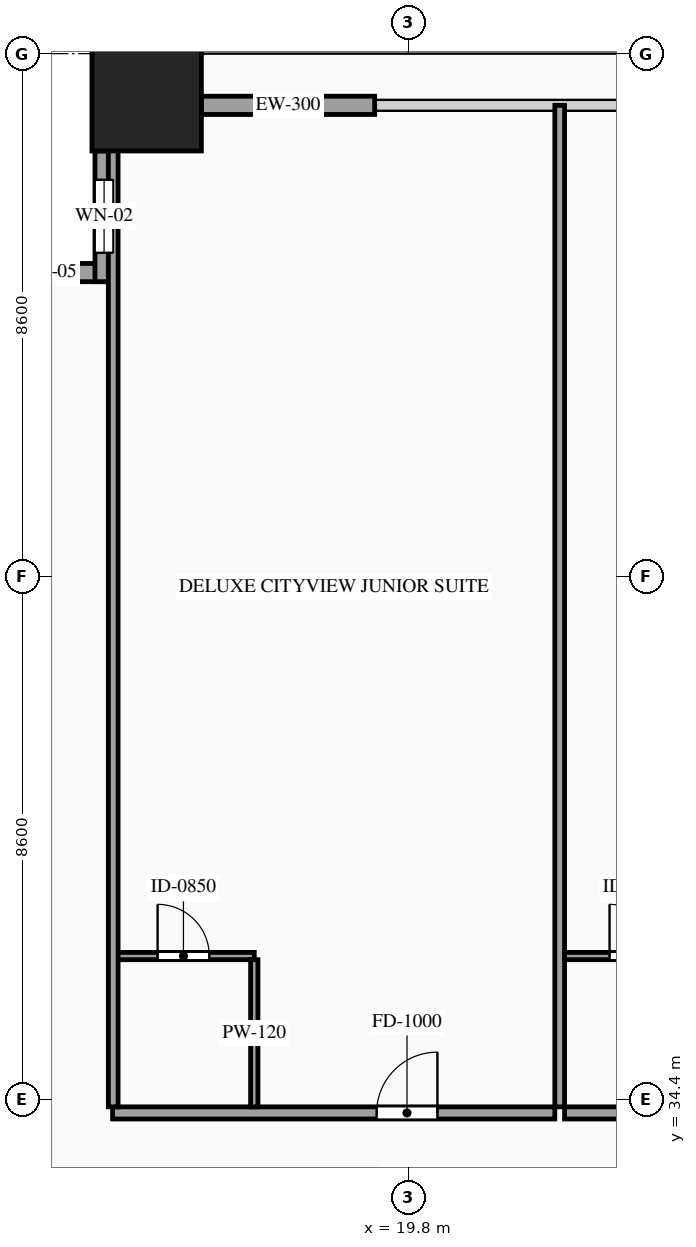
"""IFC4 building model, lengths in metres.
Left out: names, types, materials, properties, quantities, classifications, styles, units other than length and angle.
Written with IfcOpenShell. Run it as: python <this file> out.ifc"""

import sys

from ifc_helpers import new_model, si_unit, direction, frame, frame_2d, origin, origin_2d, place, context, subcontext, project, spatial, rectangle, hollow_rectangle, extrude, source, transform, mapped, element, fill, save


model = new_model("IFC4")
c1 = context("Model", 3, precision=1e-05, world=origin(), true_north=direction((0.0, 1.0)))
c2 = subcontext(c1, "Body", "Model", "MODEL_VIEW")
j1 = project(units=[si_unit("LENGTHUNIT", "METRE"), si_unit("PLANEANGLEUNIT", "RADIAN")], contexts=[c1])
p1 = place(None, origin())
s1 = spatial("IfcSite", under=j1, at=p1, CompositionType="ELEMENT")
p2 = place(p1, origin())
s2 = spatial("IfcBuilding", under=s1, at=p2, CompositionType="ELEMENT")
p3 = place(p2, frame((0.0, 0.0, 34.2)))
s3 = spatial("IfcBuildingStorey", under=s2, at=p3, CompositionType="ELEMENT", Elevation=34.2)
m1 = source(origin(), c2, "Body", "SweptSolid", [
    extrude(hollow_rectangle(XDim=1.8, YDim=1.8, WallThickness=0.08, at=origin_2d()), origin(), (0.0, 0.0, 1.0), 3.6),
])
p4 = place(p3, frame((15.5, 50.9, 0.0), z_axis=(0.0, 0.0, 1.0), x_axis=(1.0, 0.0, 0.0)))
e1 = element("IfcColumn", 1, at=p4, inside=s3, PredefinedType="COLUMN", context=c2, shape_type="MappedRepresentation", body=[
    mapped(m1, transform((0.0, 0.0, 0.0), scale=1.0)),
])
p5 = place(p3, frame((14.95, 48.0, 0.0), z_axis=(0.0, 0.0, 1.0), x_axis=(-1.0, 0.0, 0.0)))
e2 = element("IfcWall", 2, at=p5, inside=s3, PredefinedType="SOLIDWALL", context=c2, shape_type="SweptSolid", body=[
    extrude(rectangle(XDim=2.15, YDim=0.3, at=frame_2d((1.075, 0.0))), origin(), (0.0, 0.0, 1.0), 3.38),
])
p6 = place(p5, frame((0.625, 0.0, 0.85)))
e3 = element("IfcOpeningElement", 3, at=p6, cuts=e2, PredefinedType="OPENING", context=c2, shape_type="SweptSolid", body=[
    extrude(rectangle(XDim=0.9, YDim=1.5, at=frame_2d((0.45, 0.75))), frame((0.0, 0.165, 0.0), z_axis=(0.0, -1.0, 0.0), x_axis=(1.0, 0.0, 0.0)), (0.0, 0.0, 1.0), 0.33),
])
p7 = place(p3, frame((14.8, 50.0, 0.0), z_axis=(0.0, 0.0, 1.0), x_axis=(0.0, -1.0, 0.0)))
e4 = element("IfcWall", 4, at=p7, inside=s3, PredefinedType="SOLIDWALL", context=c2, shape_type="SweptSolid", body=[
    extrude(rectangle(XDim=2.15, YDim=0.3, at=frame_2d((1.075, 0.0))), origin(), (0.0, 0.0, 1.0), 3.38),
])
p8 = place(p7, frame((0.475, 0.0, 0.85)))
e5 = element("IfcOpeningElement", 5, at=p8, cuts=e4, PredefinedType="OPENING", context=c2, shape_type="SweptSolid", body=[
    extrude(rectangle(XDim=1.2, YDim=2.1, at=frame_2d((0.6, 1.05))), frame((0.0, 0.165, 0.0), z_axis=(0.0, -1.0, 0.0), x_axis=(1.0, 0.0, 0.0)), (0.0, 0.0, 1.0), 0.33),
])
m2 = source(origin(), c2, "Body", "SweptSolid", [
    extrude(rectangle(XDim=2.85, YDim=0.3, at=frame_2d((1.425, 0.0))), origin(), (0.0, 0.0, 1.0), 2.775),
])
p9 = place(p3, frame((16.4, 50.75, 0.0), z_axis=(0.0, 0.0, 1.0), x_axis=(1.0, 0.0, 0.0)))
e6 = element("IfcWall", 6, at=p9, inside=s3, PredefinedType="SOLIDWALL", context=c2, shape_type="MappedRepresentation", body=[
    mapped(m2, transform((0.0, 0.0, 0.0), scale=1.0)),
])
p10 = place(p3, frame((14.94, 34.18, 0.0), z_axis=(0.0, 0.0, 1.0), x_axis=(1.0, 0.0, 0.0)))
e7 = element("IfcWall", 7, at=p10, inside=s3, PredefinedType="PARTITIONING", context=c2, shape_type="SweptSolid", body=[
    extrude(rectangle(XDim=7.273, YDim=0.2, at=frame_2d((3.636, 0.0))), origin(), (0.0, 0.0, 1.0), 3.38),
])
p11 = place(p10, frame((4.342, 0.0, 0.0)))
e8 = element("IfcOpeningElement", 8, at=p11, cuts=e7, PredefinedType="OPENING", context=c2, shape_type="SweptSolid", body=[
    extrude(rectangle(XDim=1.0, YDim=2.2, at=frame_2d((0.5, 1.1))), frame((0.0, 0.115, 0.0), z_axis=(0.0, -1.0, 0.0), x_axis=(1.0, 0.0, 0.0)), (0.0, 0.0, 1.0), 0.23),
])
m3 = source(origin(), c2, "Body", "SweptSolid", [
    extrude(rectangle(XDim=16.47, YDim=0.16, at=frame_2d((8.235, 0.0))), origin(), (0.0, 0.0, 1.0), 3.38),
])
p12 = place(p3, frame((22.293, 34.28, 0.0), z_axis=(0.0, 0.0, 1.0), x_axis=(0.0, 1.0, 0.0)))
e9 = element("IfcWall", 9, at=p12, inside=s3, PredefinedType="PARTITIONING", context=c2, shape_type="MappedRepresentation", body=[
    mapped(m3, transform((0.0, 0.0, 0.0), scale=1.0)),
])
p13 = place(p3, frame((14.94, 36.76, 0.0), z_axis=(0.0, 0.0, 1.0), x_axis=(1.0, 0.0, 0.0)))
e10 = element("IfcWall", 10, at=p13, inside=s3, PredefinedType="PARTITIONING", context=c2, shape_type="SweptSolid", body=[
    extrude(rectangle(XDim=2.33, YDim=0.12, at=frame_2d((1.165, 0.0))), origin(), (0.0, 0.0, 1.0), 3.38),
])
p14 = place(p13, frame((0.74, 0.0, 0.0)))
e11 = element("IfcOpeningElement", 11, at=p14, cuts=e10, PredefinedType="OPENING", context=c2, shape_type="SweptSolid", body=[
    extrude(rectangle(XDim=0.85, YDim=2.1, at=frame_2d((0.425, 1.05))), frame((0.0, 0.075, 0.0), z_axis=(0.0, -1.0, 0.0), x_axis=(1.0, 0.0, 0.0)), (0.0, 0.0, 1.0), 0.15),
])
m4 = source(origin(), c2, "Body", "SweptSolid", [
    extrude(rectangle(XDim=2.42, YDim=0.12, at=frame_2d((1.21, 0.0))), origin(), (0.0, 0.0, 1.0), 3.38),
])
p15 = place(p3, frame((17.27, 34.28, 0.0), z_axis=(0.0, 0.0, 1.0), x_axis=(0.0, 1.0, 0.0)))
e12 = element("IfcWall", 12, at=p15, inside=s3, PredefinedType="PARTITIONING", context=c2, shape_type="MappedRepresentation", body=[
    mapped(m4, transform((0.0, 0.0, 0.0), scale=1.0)),
])
p16 = place(p3, frame((22.373, 34.18, 0.0), z_axis=(0.0, 0.0, 1.0), x_axis=(1.0, 0.0, 0.0)))
e13 = element("IfcWall", 13, at=p16, inside=s3, PredefinedType="PARTITIONING", context=c2, shape_type="SweptSolid", body=[
    extrude(rectangle(XDim=7.194, YDim=0.2, at=frame_2d((3.597, 0.0))), origin(), (0.0, 0.0, 1.0), 3.38),
])
p17 = place(p16, frame((4.302, 0.0, 0.0)))
e14 = element("IfcOpeningElement", 14, at=p17, cuts=e13, PredefinedType="OPENING", context=c2, shape_type="SweptSolid", body=[
    extrude(rectangle(XDim=1.0, YDim=2.2, at=frame_2d((0.5, 1.1))), frame((0.0, 0.115, 0.0), z_axis=(0.0, -1.0, 0.0), x_axis=(1.0, 0.0, 0.0)), (0.0, 0.0, 1.0), 0.23),
])
p18 = place(p3, frame((22.373, 36.76, 0.0), z_axis=(0.0, 0.0, 1.0), x_axis=(1.0, 0.0, 0.0)))
e15 = element("IfcWall", 15, at=p18, inside=s3, PredefinedType="PARTITIONING", context=c2, shape_type="SweptSolid", body=[
    extrude(rectangle(XDim=2.33, YDim=0.12, at=frame_2d((1.165, 0.0))), origin(), (0.0, 0.0, 1.0), 3.38),
])
p19 = place(p18, frame((0.74, 0.0, 0.0)))
e16 = element("IfcOpeningElement", 16, at=p19, cuts=e15, PredefinedType="OPENING", context=c2, shape_type="SweptSolid", body=[
    extrude(rectangle(XDim=0.85, YDim=2.1, at=frame_2d((0.425, 1.05))), frame((0.0, 0.075, 0.0), z_axis=(0.0, -1.0, 0.0), x_axis=(1.0, 0.0, 0.0)), (0.0, 0.0, 1.0), 0.15),
])
m5 = source(origin(), c2, "Body", "SweptSolid", [
    extrude(rectangle(XDim=16.32, YDim=0.16, at=frame_2d((8.16, 0.0))), origin(), (0.0, 0.0, 1.0), 3.38),
])
p20 = place(p3, frame((14.95, 34.28, 0.0), z_axis=(0.0, 0.0, 1.0), x_axis=(0.0, 1.0, 0.0)))
e17 = element("IfcWall", 17, at=p20, inside=s3, PredefinedType="PARTITIONING", context=c2, shape_type="MappedRepresentation", body=[
    mapped(m5, transform((0.0, 0.0, 0.0), scale=1.0)),
])
m6 = source(origin(), c2, "Body", "SweptSolid", [
    extrude(rectangle(XDim=0.9, YDim=1.5, at=frame_2d((0.45, 0.75))), frame((0.0, 0.03, 0.0), z_axis=(0.0, -1.0, 0.0), x_axis=(1.0, 0.0, 0.0)), (0.0, 0.0, 1.0), 0.06),
])
p21 = place(p6, origin())
e18 = element("IfcWindow", 18, at=p21, inside=s3, PartitioningType="SINGLE_PANEL", PredefinedType="WINDOW", context=c2, shape_type="MappedRepresentation", body=[
    mapped(m6, transform((0.0, 0.0, 0.0), scale=1.0)),
])
fill(e3, e18)
m7 = source(origin(), c2, "Body", "SweptSolid", [
    extrude(rectangle(XDim=1.2, YDim=2.1, at=frame_2d((0.6, 1.05))), frame((0.0, 0.03, 0.0), z_axis=(0.0, -1.0, 0.0), x_axis=(1.0, 0.0, 0.0)), (0.0, 0.0, 1.0), 0.06),
])
p22 = place(p8, origin())
e19 = element("IfcWindow", 19, at=p22, inside=s3, PartitioningType="SINGLE_PANEL", PredefinedType="WINDOW", context=c2, shape_type="MappedRepresentation", body=[
    mapped(m7, transform((0.0, 0.0, 0.0), scale=1.0)),
])
fill(e5, e19)
m8 = source(origin(), c2, "Body", "SweptSolid", [
    extrude(rectangle(XDim=1.0, YDim=2.2, at=frame_2d((0.5, 1.1))), frame((0.0, 0.025, 0.0), z_axis=(0.0, -1.0, 0.0), x_axis=(1.0, 0.0, 0.0)), (0.0, 0.0, 1.0), 0.05),
])
p23 = place(p11, origin())
e20 = element("IfcDoor", 20, at=p23, inside=s3, OperationType="SINGLE_SWING_RIGHT", PredefinedType="DOOR", context=c2, shape_type="MappedRepresentation", body=[
    mapped(m8, transform((0.0, 0.0, 0.0), scale=1.0)),
])
fill(e8, e20)
m9 = source(origin(), c2, "Body", "SweptSolid", [
    extrude(rectangle(XDim=0.85, YDim=2.1, at=frame_2d((0.425, 1.05))), frame((0.0, 0.025, 0.0), z_axis=(0.0, -1.0, 0.0), x_axis=(1.0, 0.0, 0.0)), (0.0, 0.0, 1.0), 0.05),
])
p24 = place(p14, origin())
e21 = element("IfcDoor", 21, at=p24, inside=s3, OperationType="SINGLE_SWING_LEFT", PredefinedType="DOOR", context=c2, shape_type="MappedRepresentation", body=[
    mapped(m9, transform((0.0, 0.0, 0.0), scale=1.0)),
])
fill(e11, e21)
p25 = place(p19, origin())
e22 = element("IfcDoor", 22, at=p25, inside=s3, OperationType="SINGLE_SWING_LEFT", PredefinedType="DOOR", context=c2, shape_type="MappedRepresentation", body=[
    mapped(m9, transform((0.0, 0.0, 0.0), scale=1.0)),
])
fill(e16, e22)
save(model, sys.argv[1])
